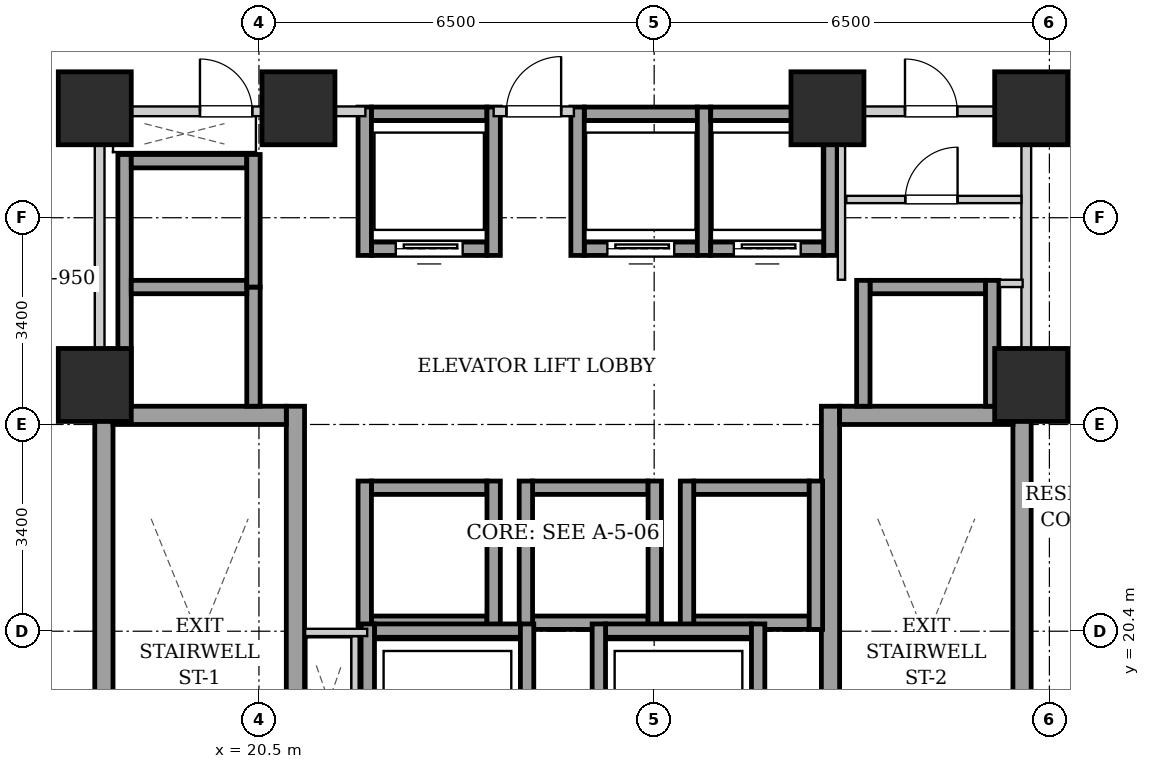
"""IFC4 building model, lengths in metres.
Left out: names, types, materials, properties, quantities, classifications, styles, units other than length and angle.
Written with IfcOpenShell. Run it as: python <this file> out.ifc"""

import sys

from ifc_helpers import new_model, si_unit, direction, frame, frame_2d, origin, origin_2d, place, context, subcontext, project, spatial, rectangle, extrude, element, fill, save


model = new_model("IFC4")
c1 = context("Model", 3, precision=1e-05, world=origin(), true_north=direction((0.0, 1.0)))
c2 = subcontext(c1, "Body", "Model", "MODEL_VIEW")
j1 = project(units=[si_unit("LENGTHUNIT", "METRE"), si_unit("PLANEANGLEUNIT", "RADIAN")], contexts=[c1])
p1 = place(None, origin())
s1 = spatial("IfcSite", under=j1, at=p1, CompositionType="ELEMENT")
p2 = place(p1, origin())
s2 = spatial("IfcBuilding", under=s1, at=p2, CompositionType="ELEMENT")
p3 = place(p2, frame((0.0, 0.0, 38.6)))
s3 = spatial("IfcBuildingStorey", under=s2, at=p3, CompositionType="ELEMENT", Elevation=38.6)
for number, where, z_axis, x_axis in (
    (1, (17.8, 29.0, 0.0), (0.0, 0.0, 1.0), (1.0, 0.0, 0.0)),
    (2, (21.15, 29.0, 0.0), (0.0, 0.0, 1.0), (1.0, 0.0, 0.0)),
    (3, (29.85, 29.0, 0.0), (0.0, 0.0, 1.0), (1.0, 0.0, 0.0)),
    (4, (33.2, 29.0, 0.0), (0.0, 0.0, 1.0), (1.0, 0.0, 0.0)),
    (5, (17.8, 24.45, 0.0), (0.0, 0.0, 1.0), (1.0, 0.0, 0.0)),
    (6, (33.2, 24.45, 0.0), (0.0, 0.0, 1.0), (1.0, 0.0, 0.0)),
):
    element("IfcColumn", number, at=place(p3, frame(where, z_axis=z_axis, x_axis=x_axis)), inside=s3, PredefinedType="COLUMN", context=c2, shape_type="SweptSolid", body=[
        extrude(rectangle(XDim=1.2, YDim=1.2, at=origin_2d()), origin(), (0.0, 0.0, 1.0), 3.2),
    ])
for number, where, z_axis, x_axis in (
    (7, (17.95, 15.1, 0.0), (0.0, 0.0, 1.0), (0.0, 1.0, 0.0)),
    (8, (21.1, 15.1, 0.0), (0.0, 0.0, 1.0), (0.0, 1.0, 0.0)),
):
    element("IfcWall", number, at=place(p3, frame(where, z_axis=z_axis, x_axis=x_axis)), inside=s3, PredefinedType="SHEAR", context=c2, shape_type="SweptSolid", body=[
        extrude(rectangle(XDim=9.0, YDim=0.3, at=frame_2d((4.5, 0.0))), origin(), (0.0, 0.0, 1.0), 2.94),
    ])
p4 = place(p3, frame((18.1, 23.95, 0.0), z_axis=(0.0, 0.0, 1.0), x_axis=(1.0, 0.0, 0.0)))
e9 = element("IfcWall", 9, at=p4, inside=s3, PredefinedType="SHEAR", context=c2, shape_type="SweptSolid", body=[
    extrude(rectangle(XDim=2.85, YDim=0.3, at=frame_2d((1.425, 0.0))), origin(), (0.0, 0.0, 1.0), 2.94),
])
for number, where, z_axis, x_axis in (
    (10, (29.9, 15.1, 0.0), (0.0, 0.0, 1.0), (0.0, 1.0, 0.0)),
    (11, (33.05, 15.1, 0.0), (0.0, 0.0, 1.0), (0.0, 1.0, 0.0)),
):
    element("IfcWall", number, at=place(p3, frame(where, z_axis=z_axis, x_axis=x_axis)), inside=s3, PredefinedType="SHEAR", context=c2, shape_type="SweptSolid", body=[
        extrude(rectangle(XDim=9.0, YDim=0.3, at=frame_2d((4.5, 0.0))), origin(), (0.0, 0.0, 1.0), 2.94),
    ])
p5 = place(p3, frame((30.05, 23.95, 0.0), z_axis=(0.0, 0.0, 1.0), x_axis=(1.0, 0.0, 0.0)))
e12 = element("IfcWall", 12, at=p5, inside=s3, PredefinedType="SHEAR", context=c2, shape_type="SweptSolid", body=[
    extrude(rectangle(XDim=2.85, YDim=0.3, at=frame_2d((1.425, 0.0))), origin(), (0.0, 0.0, 1.0), 2.94),
])
p6 = place(p3, frame((22.35, 26.69, 0.0), z_axis=(0.0, 0.0, 1.0), x_axis=(1.0, 0.0, 0.0)))
e13 = element("IfcWall", 13, at=p6, inside=s3, PredefinedType="SHEAR", context=c2, shape_type="SweptSolid", body=[
    extrude(rectangle(XDim=1.9, YDim=0.22, at=frame_2d((0.95, 0.0))), origin(), (0.0, 0.0, 1.0), 2.94),
])
p7 = place(p6, frame((0.4, 0.0, 0.0)))
e14 = element("IfcOpeningElement", 14, at=p7, cuts=e13, PredefinedType="OPENING", context=c2, shape_type="SweptSolid", body=[
    extrude(rectangle(XDim=1.1, YDim=2.15, at=frame_2d((0.55, 1.075))), frame((0.0, 0.12, 0.0), z_axis=(0.0, -1.0, 0.0), x_axis=(1.0, 0.0, 0.0)), (0.0, 0.0, 1.0), 0.24),
])
p8 = place(p3, frame((22.35, 28.91, 0.0), z_axis=(0.0, 0.0, 1.0), x_axis=(1.0, 0.0, 0.0)))
e15 = element("IfcWall", 15, at=p8, inside=s3, PredefinedType="SHEAR", context=c2, shape_type="SweptSolid", body=[
    extrude(rectangle(XDim=1.9, YDim=0.22, at=frame_2d((0.95, 0.0))), origin(), (0.0, 0.0, 1.0), 2.94),
])
for number, where, z_axis, x_axis in (
    (16, (22.24, 26.58, 0.0), (0.0, 0.0, 1.0), (0.0, 1.0, 0.0)),
    (17, (24.36, 26.58, 0.0), (0.0, 0.0, 1.0), (0.0, 1.0, 0.0)),
):
    element("IfcWall", number, at=place(p3, frame(where, z_axis=z_axis, x_axis=x_axis)), inside=s3, PredefinedType="SHEAR", context=c2, shape_type="SweptSolid", body=[
        extrude(rectangle(XDim=2.44, YDim=0.22, at=frame_2d((1.22, 0.0))), origin(), (0.0, 0.0, 1.0), 2.94),
    ])
p9 = place(p3, frame((25.85, 26.69, 0.0), z_axis=(0.0, 0.0, 1.0), x_axis=(1.0, 0.0, 0.0)))
e18 = element("IfcWall", 18, at=p9, inside=s3, PredefinedType="SHEAR", context=c2, shape_type="SweptSolid", body=[
    extrude(rectangle(XDim=1.86, YDim=0.22, at=frame_2d((0.93, 0.0))), origin(), (0.0, 0.0, 1.0), 2.94),
])
p10 = place(p9, frame((0.38, 0.0, 0.0)))
e19 = element("IfcOpeningElement", 19, at=p10, cuts=e18, PredefinedType="OPENING", context=c2, shape_type="SweptSolid", body=[
    extrude(rectangle(XDim=1.1, YDim=2.15, at=frame_2d((0.55, 1.075))), frame((0.0, 0.12, 0.0), z_axis=(0.0, -1.0, 0.0), x_axis=(1.0, 0.0, 0.0)), (0.0, 0.0, 1.0), 0.24),
])
p11 = place(p3, frame((25.85, 28.91, 0.0), z_axis=(0.0, 0.0, 1.0), x_axis=(1.0, 0.0, 0.0)))
e20 = element("IfcWall", 20, at=p11, inside=s3, PredefinedType="SHEAR", context=c2, shape_type="SweptSolid", body=[
    extrude(rectangle(XDim=1.86, YDim=0.22, at=frame_2d((0.93, 0.0))), origin(), (0.0, 0.0, 1.0), 2.94),
])
for number, where, z_axis, x_axis in (
    (21, (25.74, 26.58, 0.0), (0.0, 0.0, 1.0), (0.0, 1.0, 0.0)),
    (22, (27.82, 26.58, 0.0), (0.0, 0.0, 1.0), (0.0, 1.0, 0.0)),
):
    element("IfcWall", number, at=place(p3, frame(where, z_axis=z_axis, x_axis=x_axis)), inside=s3, PredefinedType="SHEAR", context=c2, shape_type="SweptSolid", body=[
        extrude(rectangle(XDim=2.44, YDim=0.22, at=frame_2d((1.22, 0.0))), origin(), (0.0, 0.0, 1.0), 2.94),
    ])
p12 = place(p3, frame((27.93, 26.69, 0.0), z_axis=(0.0, 0.0, 1.0), x_axis=(1.0, 0.0, 0.0)))
e23 = element("IfcWall", 23, at=p12, inside=s3, PredefinedType="SHEAR", context=c2, shape_type="SweptSolid", body=[
    extrude(rectangle(XDim=1.86, YDim=0.22, at=frame_2d((0.93, 0.0))), origin(), (0.0, 0.0, 1.0), 2.94),
])
p13 = place(p12, frame((0.38, 0.0, 0.0)))
e24 = element("IfcOpeningElement", 24, at=p13, cuts=e23, PredefinedType="OPENING", context=c2, shape_type="SweptSolid", body=[
    extrude(rectangle(XDim=1.1, YDim=2.15, at=frame_2d((0.55, 1.075))), frame((0.0, 0.12, 0.0), z_axis=(0.0, -1.0, 0.0), x_axis=(1.0, 0.0, 0.0)), (0.0, 0.0, 1.0), 0.24),
])
p14 = place(p3, frame((27.93, 28.91, 0.0), z_axis=(0.0, 0.0, 1.0), x_axis=(1.0, 0.0, 0.0)))
e25 = element("IfcWall", 25, at=p14, inside=s3, PredefinedType="SHEAR", context=c2, shape_type="SweptSolid", body=[
    extrude(rectangle(XDim=1.86, YDim=0.22, at=frame_2d((0.93, 0.0))), origin(), (0.0, 0.0, 1.0), 2.94),
])
p15 = place(p3, frame((29.9, 26.58, 0.0), z_axis=(0.0, 0.0, 1.0), x_axis=(0.0, 1.0, 0.0)))
e26 = element("IfcWall", 26, at=p15, inside=s3, PredefinedType="SHEAR", context=c2, shape_type="SweptSolid", body=[
    extrude(rectangle(XDim=2.44, YDim=0.22, at=frame_2d((1.22, 0.0))), origin(), (0.0, 0.0, 1.0), 2.94),
])
for number, where, z_axis, x_axis in (
    (27, (22.35, 20.54, 0.0), (0.0, 0.0, 1.0), (1.0, 0.0, 0.0)),
    (28, (22.35, 22.76, 0.0), (0.0, 0.0, 1.0), (1.0, 0.0, 0.0)),
):
    element("IfcWall", number, at=place(p3, frame(where, z_axis=z_axis, x_axis=x_axis)), inside=s3, PredefinedType="SHEAR", context=c2, shape_type="SweptSolid", body=[
        extrude(rectangle(XDim=1.9, YDim=0.22, at=frame_2d((0.95, 0.0))), origin(), (0.0, 0.0, 1.0), 2.94),
    ])
for number, where, z_axis, x_axis in (
    (29, (22.24, 20.43, 0.0), (0.0, 0.0, 1.0), (0.0, 1.0, 0.0)),
    (30, (24.36, 20.43, 0.0), (0.0, 0.0, 1.0), (0.0, 1.0, 0.0)),
):
    element("IfcWall", number, at=place(p3, frame(where, z_axis=z_axis, x_axis=x_axis)), inside=s3, PredefinedType="SHEAR", context=c2, shape_type="SweptSolid", body=[
        extrude(rectangle(XDim=2.44, YDim=0.22, at=frame_2d((1.22, 0.0))), origin(), (0.0, 0.0, 1.0), 2.94),
    ])
for number, where, z_axis, x_axis in (
    (31, (25.0, 20.54, 0.0), (0.0, 0.0, 1.0), (1.0, 0.0, 0.0)),
    (32, (25.0, 22.76, 0.0), (0.0, 0.0, 1.0), (1.0, 0.0, 0.0)),
):
    element("IfcWall", number, at=place(p3, frame(where, z_axis=z_axis, x_axis=x_axis)), inside=s3, PredefinedType="SHEAR", context=c2, shape_type="SweptSolid", body=[
        extrude(rectangle(XDim=1.9, YDim=0.22, at=frame_2d((0.95, 0.0))), origin(), (0.0, 0.0, 1.0), 2.94),
    ])
for number, where, z_axis, x_axis in (
    (33, (24.89, 20.43, 0.0), (0.0, 0.0, 1.0), (0.0, 1.0, 0.0)),
    (34, (27.01, 20.43, 0.0), (0.0, 0.0, 1.0), (0.0, 1.0, 0.0)),
):
    element("IfcWall", number, at=place(p3, frame(where, z_axis=z_axis, x_axis=x_axis)), inside=s3, PredefinedType="SHEAR", context=c2, shape_type="SweptSolid", body=[
        extrude(rectangle(XDim=2.44, YDim=0.22, at=frame_2d((1.22, 0.0))), origin(), (0.0, 0.0, 1.0), 2.94),
    ])
for number, where, z_axis, x_axis in (
    (35, (27.65, 20.54, 0.0), (0.0, 0.0, 1.0), (1.0, 0.0, 0.0)),
    (36, (27.65, 22.76, 0.0), (0.0, 0.0, 1.0), (1.0, 0.0, 0.0)),
):
    element("IfcWall", number, at=place(p3, frame(where, z_axis=z_axis, x_axis=x_axis)), inside=s3, PredefinedType="SHEAR", context=c2, shape_type="SweptSolid", body=[
        extrude(rectangle(XDim=1.9, YDim=0.22, at=frame_2d((0.95, 0.0))), origin(), (0.0, 0.0, 1.0), 2.94),
    ])
for number, where, z_axis, x_axis in (
    (37, (27.54, 20.43, 0.0), (0.0, 0.0, 1.0), (0.0, 1.0, 0.0)),
    (38, (29.66, 20.43, 0.0), (0.0, 0.0, 1.0), (0.0, 1.0, 0.0)),
):
    element("IfcWall", number, at=place(p3, frame(where, z_axis=z_axis, x_axis=x_axis)), inside=s3, PredefinedType="SHEAR", context=c2, shape_type="SweptSolid", body=[
        extrude(rectangle(XDim=2.44, YDim=0.22, at=frame_2d((1.22, 0.0))), origin(), (0.0, 0.0, 1.0), 2.94),
    ])
p16 = place(p3, frame((18.29, 24.1, 0.0), z_axis=(0.0, 0.0, 1.0), x_axis=(0.0, 1.0, 0.0)))
e39 = element("IfcWall", 39, at=p16, inside=s3, PredefinedType="SHEAR", context=c2, shape_type="SweptSolid", body=[
    extrude(rectangle(XDim=4.14, YDim=0.22, at=frame_2d((2.07, 0.0))), origin(), (0.0, 0.0, 1.0), 2.94),
])
p17 = place(p3, frame((20.41, 24.1, 0.0), z_axis=(0.0, 0.0, 1.0), x_axis=(0.0, 1.0, 0.0)))
e40 = element("IfcWall", 40, at=p17, inside=s3, PredefinedType="SHEAR", context=c2, shape_type="SweptSolid", body=[
    extrude(rectangle(XDim=1.96, YDim=0.22, at=frame_2d((0.98, 0.0))), origin(), (0.0, 0.0, 1.0), 2.94),
])
for number, where, z_axis, x_axis in (
    (41, (18.4, 26.06, 0.0), (0.0, 0.0, 1.0), (1.0, 0.0, 0.0)),
    (42, (18.4, 28.13, 0.0), (0.0, 0.0, 1.0), (1.0, 0.0, 0.0)),
):
    element("IfcWall", number, at=place(p3, frame(where, z_axis=z_axis, x_axis=x_axis)), inside=s3, PredefinedType="SHEAR", context=c2, shape_type="SweptSolid", body=[
        extrude(rectangle(XDim=1.9, YDim=0.22, at=frame_2d((0.95, 0.0))), origin(), (0.0, 0.0, 1.0), 2.94),
    ])
p18 = place(p3, frame((20.41, 26.06, 0.0), z_axis=(0.0, 0.0, 1.0), x_axis=(0.0, 1.0, 0.0)))
e43 = element("IfcWall", 43, at=p18, inside=s3, PredefinedType="SHEAR", context=c2, shape_type="SweptSolid", body=[
    extrude(rectangle(XDim=2.18, YDim=0.22, at=frame_2d((1.09, 0.0))), origin(), (0.0, 0.0, 1.0), 2.94),
])
p19 = place(p3, frame((30.55, 26.06, 0.0), z_axis=(0.0, 0.0, 1.0), x_axis=(1.0, 0.0, 0.0)))
e44 = element("IfcWall", 44, at=p19, inside=s3, PredefinedType="SHEAR", context=c2, shape_type="SweptSolid", body=[
    extrude(rectangle(XDim=1.9, YDim=0.22, at=frame_2d((0.95, 0.0))), origin(), (0.0, 0.0, 1.0), 2.94),
])
for number, where, z_axis, x_axis in (
    (45, (30.44, 24.1, 0.0), (0.0, 0.0, 1.0), (0.0, 1.0, 0.0)),
    (46, (32.56, 24.1, 0.0), (0.0, 0.0, 1.0), (0.0, 1.0, 0.0)),
):
    element("IfcWall", number, at=place(p3, frame(where, z_axis=z_axis, x_axis=x_axis)), inside=s3, PredefinedType="SHEAR", context=c2, shape_type="SweptSolid", body=[
        extrude(rectangle(XDim=2.07, YDim=0.22, at=frame_2d((1.035, 0.0))), origin(), (0.0, 0.0, 1.0), 2.94),
    ])
p20 = place(p3, frame((22.4, 20.41, 0.0), z_axis=(0.0, 0.0, 1.0), x_axis=(1.0, 0.0, 0.0)))
e47 = element("IfcWall", 47, at=p20, inside=s3, PredefinedType="SHEAR", context=c2, shape_type="SweptSolid", body=[
    extrude(rectangle(XDim=2.4, YDim=0.22, at=frame_2d((1.2, 0.0))), origin(), (0.0, 0.0, 1.0), 2.94),
])
for number, where, z_axis, x_axis in (
    (48, (22.29, 17.98, 0.0), (0.0, 0.0, 1.0), (0.0, 1.0, 0.0)),
    (49, (24.91, 17.98, 0.0), (0.0, 0.0, 1.0), (0.0, 1.0, 0.0)),
):
    element("IfcWall", number, at=place(p3, frame(where, z_axis=z_axis, x_axis=x_axis)), inside=s3, PredefinedType="SHEAR", context=c2, shape_type="SweptSolid", body=[
        extrude(rectangle(XDim=2.54, YDim=0.22, at=frame_2d((1.27, 0.0))), origin(), (0.0, 0.0, 1.0), 2.94),
    ])
p21 = place(p3, frame((26.2, 20.41, 0.0), z_axis=(0.0, 0.0, 1.0), x_axis=(1.0, 0.0, 0.0)))
e50 = element("IfcWall", 50, at=p21, inside=s3, PredefinedType="SHEAR", context=c2, shape_type="SweptSolid", body=[
    extrude(rectangle(XDim=2.4, YDim=0.22, at=frame_2d((1.2, 0.0))), origin(), (0.0, 0.0, 1.0), 2.94),
])
for number, where, z_axis, x_axis in (
    (51, (26.09, 17.98, 0.0), (0.0, 0.0, 1.0), (0.0, 1.0, 0.0)),
    (52, (28.71, 17.98, 0.0), (0.0, 0.0, 1.0), (0.0, 1.0, 0.0)),
):
    element("IfcWall", number, at=place(p3, frame(where, z_axis=z_axis, x_axis=x_axis)), inside=s3, PredefinedType="SHEAR", context=c2, shape_type="SweptSolid", body=[
        extrude(rectangle(XDim=2.54, YDim=0.22, at=frame_2d((1.27, 0.0))), origin(), (0.0, 0.0, 1.0), 2.94),
    ])
for number, where, z_axis, x_axis in (
    (53, (17.88, 24.12, 0.0), (0.0, 0.0, 1.0), (0.0, 1.0, 0.0)),
    (54, (33.12, 24.12, 0.0), (0.0, 0.0, 1.0), (0.0, 1.0, 0.0)),
):
    element("IfcWall", number, at=place(p3, frame(where, z_axis=z_axis, x_axis=x_axis)), inside=s3, PredefinedType="PARTITIONING", context=c2, shape_type="SweptSolid", body=[
        extrude(rectangle(XDim=4.76, YDim=0.16, at=frame_2d((2.38, 0.0))), origin(), (0.0, 0.0, 1.0), 2.275),
    ])
p22 = place(p3, frame((24.36, 28.95, 0.0), z_axis=(0.0, 0.0, 1.0), x_axis=(1.0, 0.0, 0.0)))
e55 = element("IfcWall", 55, at=p22, inside=s3, PredefinedType="PARTITIONING", context=c2, shape_type="SweptSolid", body=[
    extrude(rectangle(XDim=1.32, YDim=0.16, at=frame_2d((0.66, 0.0))), origin(), (0.0, 0.0, 1.0), 2.155),
])
p23 = place(p22, frame((0.21, 0.0, 0.0)))
e56 = element("IfcOpeningElement", 56, at=p23, cuts=e55, PredefinedType="OPENING", context=c2, shape_type="SweptSolid", body=[
    extrude(rectangle(XDim=0.9, YDim=2.05, at=frame_2d((0.45, 1.025))), frame((0.0, 0.09, 0.0), z_axis=(0.0, -1.0, 0.0), x_axis=(1.0, 0.0, 0.0)), (0.0, 0.0, 1.0), 0.18),
])
p24 = place(p3, frame((17.96, 28.95, 0.0), z_axis=(0.0, 0.0, 1.0), x_axis=(1.0, 0.0, 0.0)))
e57 = element("IfcWall", 57, at=p24, inside=s3, PredefinedType="PARTITIONING", context=c2, shape_type="SweptSolid", body=[
    extrude(rectangle(XDim=4.29, YDim=0.16, at=frame_2d((2.145, 0.0))), origin(), (0.0, 0.0, 1.0), 2.155),
])
p25 = place(p24, frame((1.57, 0.0, 0.0)))
e58 = element("IfcOpeningElement", 58, at=p25, cuts=e57, PredefinedType="OPENING", context=c2, shape_type="SweptSolid", body=[
    extrude(rectangle(XDim=0.86, YDim=2.05, at=frame_2d((0.43, 1.025))), frame((0.0, 0.09, 0.0), z_axis=(0.0, -1.0, 0.0), x_axis=(1.0, 0.0, 0.0)), (0.0, 0.0, 1.0), 0.18),
])
p26 = place(p3, frame((22.08, 18.2, 0.0), z_axis=(0.0, 0.0, 1.0), x_axis=(0.0, 1.0, 0.0)))
e59 = element("IfcWall", 59, at=p26, inside=s3, PredefinedType="PARTITIONING", context=c2, shape_type="SweptSolid", body=[
    extrude(rectangle(XDim=2.12, YDim=0.12, at=frame_2d((1.06, 0.0))), origin(), (0.0, 0.0, 1.0), 2.94),
])
p27 = place(p3, frame((22.28, 20.38, 0.0), z_axis=(0.0, 0.0, 1.0), x_axis=(-1.0, 0.0, 0.0)))
e60 = element("IfcWall", 60, at=p27, inside=s3, PredefinedType="PARTITIONING", context=c2, shape_type="SweptSolid", body=[
    extrude(rectangle(XDim=1.02, YDim=0.12, at=frame_2d((0.51, 0.0))), origin(), (0.0, 0.0, 1.0), 2.94),
])
p28 = place(p3, frame((30.08, 26.18, 0.0), z_axis=(0.0, 0.0, 1.0), x_axis=(0.0, 1.0, 0.0)))
e61 = element("IfcWall", 61, at=p28, inside=s3, PredefinedType="PARTITIONING", context=c2, shape_type="SweptSolid", body=[
    extrude(rectangle(XDim=2.68, YDim=0.12, at=frame_2d((1.34, 0.0))), origin(), (0.0, 0.0, 1.0), 2.94),
])
p29 = place(p3, frame((32.68, 26.12, 0.0), z_axis=(0.0, 0.0, 1.0), x_axis=(1.0, 0.0, 0.0)))
e62 = element("IfcWall", 62, at=p29, inside=s3, PredefinedType="PARTITIONING", context=c2, shape_type="SweptSolid", body=[
    extrude(rectangle(XDim=0.38, YDim=0.12, at=frame_2d((0.19, 0.0))), origin(), (0.0, 0.0, 1.0), 2.94),
])
p30 = place(p3, frame((30.16, 27.5, 0.0), z_axis=(0.0, 0.0, 1.0), x_axis=(1.0, 0.0, 0.0)))
e63 = element("IfcWall", 63, at=p30, inside=s3, PredefinedType="PARTITIONING", context=c2, shape_type="SweptSolid", body=[
    extrude(rectangle(XDim=2.88, YDim=0.12, at=frame_2d((1.44, 0.0))), origin(), (0.0, 0.0, 1.0), 2.94),
])
p31 = place(p30, frame((0.97, 0.0, 0.0)))
e64 = element("IfcOpeningElement", 64, at=p31, cuts=e63, PredefinedType="OPENING", context=c2, shape_type="SweptSolid", body=[
    extrude(rectangle(XDim=0.86, YDim=2.05, at=frame_2d((0.43, 1.025))), frame((0.0, 0.07, 0.0), z_axis=(0.0, -1.0, 0.0), x_axis=(1.0, 0.0, 0.0)), (0.0, 0.0, 1.0), 0.14),
])
p32 = place(p3, frame((30.08, 28.95, 0.0), z_axis=(0.0, 0.0, 1.0), x_axis=(1.0, 0.0, 0.0)))
e65 = element("IfcWall", 65, at=p32, inside=s3, PredefinedType="PARTITIONING", context=c2, shape_type="SweptSolid", body=[
    extrude(rectangle(XDim=2.96, YDim=0.16, at=frame_2d((1.48, 0.0))), origin(), (0.0, 0.0, 1.0), 2.94),
])
p33 = place(p32, frame((1.045, 0.0, 0.0)))
e66 = element("IfcOpeningElement", 66, at=p33, cuts=e65, PredefinedType="OPENING", context=c2, shape_type="SweptSolid", body=[
    extrude(rectangle(XDim=0.86, YDim=2.05, at=frame_2d((0.43, 1.025))), frame((0.0, 0.09, 0.0), z_axis=(0.0, -1.0, 0.0), x_axis=(1.0, 0.0, 0.0)), (0.0, 0.0, 1.0), 0.18),
])
p34 = place(p7, origin())
e67 = element("IfcDoor", 67, at=p34, inside=s3, OperationType="SLIDING_TO_LEFT", PredefinedType="DOOR", context=c2, shape_type="SweptSolid", body=[
    extrude(rectangle(XDim=1.1, YDim=2.15, at=frame_2d((0.55, 1.075))), frame((0.0, 0.025, 0.0), z_axis=(0.0, -1.0, 0.0), x_axis=(1.0, 0.0, 0.0)), (0.0, 0.0, 1.0), 0.05),
])
fill(e14, e67)
p35 = place(p10, origin())
e68 = element("IfcDoor", 68, at=p35, inside=s3, OperationType="SLIDING_TO_LEFT", PredefinedType="DOOR", context=c2, shape_type="SweptSolid", body=[
    extrude(rectangle(XDim=1.1, YDim=2.15, at=frame_2d((0.55, 1.075))), frame((0.0, 0.025, 0.0), z_axis=(0.0, -1.0, 0.0), x_axis=(1.0, 0.0, 0.0)), (0.0, 0.0, 1.0), 0.05),
])
fill(e19, e68)
p36 = place(p13, origin())
e69 = element("IfcDoor", 69, at=p36, inside=s3, OperationType="SLIDING_TO_LEFT", PredefinedType="DOOR", context=c2, shape_type="SweptSolid", body=[
    extrude(rectangle(XDim=1.1, YDim=2.15, at=frame_2d((0.55, 1.075))), frame((0.0, 0.025, 0.0), z_axis=(0.0, -1.0, 0.0), x_axis=(1.0, 0.0, 0.0)), (0.0, 0.0, 1.0), 0.05),
])
fill(e24, e69)
p37 = place(p23, origin())
e70 = element("IfcDoor", 70, at=p37, inside=s3, OperationType="SINGLE_SWING_RIGHT", PredefinedType="DOOR", context=c2, shape_type="SweptSolid", body=[
    extrude(rectangle(XDim=0.9, YDim=2.05, at=frame_2d((0.45, 1.025))), frame((0.0, 0.025, 0.0), z_axis=(0.0, -1.0, 0.0), x_axis=(1.0, 0.0, 0.0)), (0.0, 0.0, 1.0), 0.05),
])
fill(e56, e70)
p38 = place(p25, origin())
e71 = element("IfcDoor", 71, at=p38, inside=s3, OperationType="SINGLE_SWING_LEFT", PredefinedType="DOOR", context=c2, shape_type="SweptSolid", body=[
    extrude(rectangle(XDim=0.86, YDim=2.05, at=frame_2d((0.43, 1.025))), frame((0.0, 0.025, 0.0), z_axis=(0.0, -1.0, 0.0), x_axis=(1.0, 0.0, 0.0)), (0.0, 0.0, 1.0), 0.05),
])
fill(e58, e71)
p39 = place(p31, origin())
e72 = element("IfcDoor", 72, at=p39, inside=s3, OperationType="SINGLE_SWING_RIGHT", PredefinedType="DOOR", context=c2, shape_type="SweptSolid", body=[
    extrude(rectangle(XDim=0.86, YDim=2.05, at=frame_2d((0.43, 1.025))), frame((0.0, 0.025, 0.0), z_axis=(0.0, -1.0, 0.0), x_axis=(1.0, 0.0, 0.0)), (0.0, 0.0, 1.0), 0.05),
])
fill(e64, e72)
p40 = place(p33, origin())
e73 = element("IfcDoor", 73, at=p40, inside=s3, OperationType="SINGLE_SWING_LEFT", PredefinedType="DOOR", context=c2, shape_type="SweptSolid", body=[
    extrude(rectangle(XDim=0.86, YDim=2.05, at=frame_2d((0.43, 1.025))), frame((0.0, 0.025, 0.0), z_axis=(0.0, -1.0, 0.0), x_axis=(1.0, 0.0, 0.0)), (0.0, 0.0, 1.0), 0.05),
])
fill(e66, e73)
save(model, sys.argv[1])
